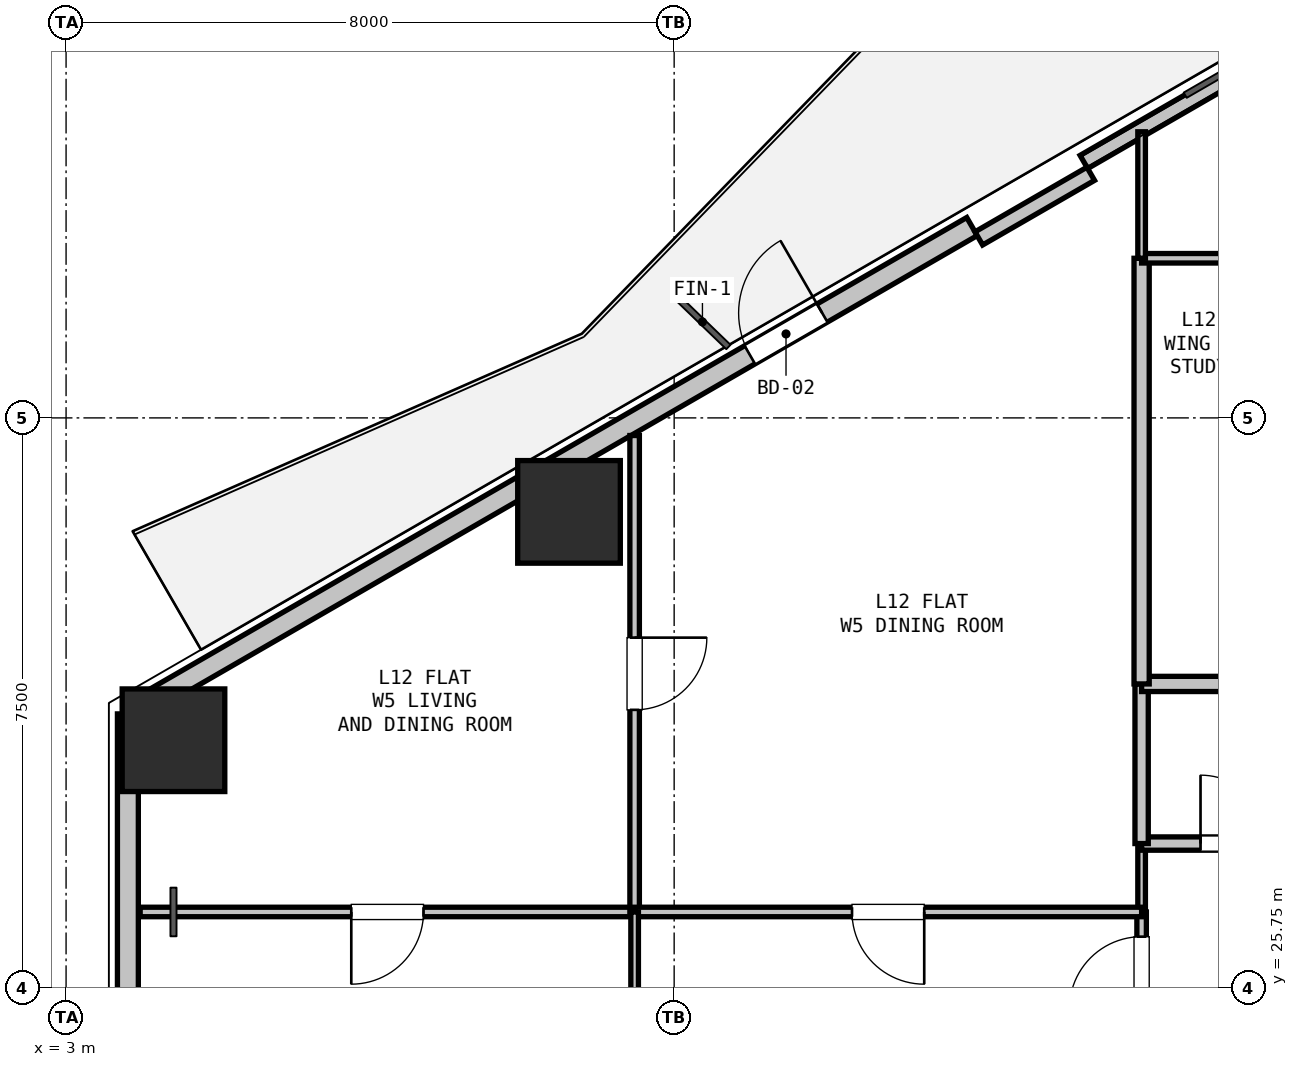
"""IFC4 building model, lengths in metres.
Left out: names, types, materials, properties, quantities, classifications, styles, units other than length and angle.
Written with IfcOpenShell. Run it as: python <this file> out.ifc"""

import sys

from ifc_helpers import new_model, si_unit, direction, frame, frame_2d, origin, origin_2d, place, context, subcontext, project, spatial, rectangle, hollow_rectangle, extrude, element, fill, save


model = new_model("IFC4")
c1 = context("Model", 3, precision=1e-05, world=origin(), true_north=direction((0.0, 1.0)))
c2 = subcontext(c1, "Body", "Model", "MODEL_VIEW")
j1 = project(units=[si_unit("LENGTHUNIT", "METRE"), si_unit("PLANEANGLEUNIT", "RADIAN")], contexts=[c1])
p1 = place(None, origin())
s1 = spatial("IfcSite", under=j1, at=p1, CompositionType="ELEMENT")
p2 = place(p1, origin())
s2 = spatial("IfcBuilding", under=s1, at=p2, CompositionType="ELEMENT")
p3 = place(p2, frame((0.0, 0.0, 45.6)))
s3 = spatial("IfcBuildingStorey", under=s2, at=p3, CompositionType="ELEMENT", Elevation=45.6)
for number, where, z_axis, x_axis in (
    (1, (4.413, 29.009, 0.0), (0.0, 0.0, 1.0), (1.0, 0.0, 0.0)),
    (2, (9.617, 32.014, 0.0), (0.0, 0.0, 1.0), (1.0, 0.0, 0.0)),
):
    element("IfcColumn", number, at=place(p3, frame(where, z_axis=z_axis, x_axis=x_axis)), inside=s3, PredefinedType="COLUMN", context=c2, shape_type="SweptSolid", body=[
        extrude(hollow_rectangle(XDim=1.35, YDim=1.35, WallThickness=0.036, at=origin_2d()), origin(), (0.0, 0.0, 1.0), 3.3),
    ])
p4 = place(p3, frame((3.813, 24.144, 0.0), z_axis=(0.0, 0.0, 1.0), x_axis=(0.0, 1.0, 0.0)))
e3 = element("IfcWall", 3, at=p4, inside=s3, PredefinedType="SOLIDWALL", context=c2, shape_type="SweptSolid", body=[
    extrude(rectangle(XDim=5.211, YDim=0.275, at=frame_2d((2.606, 0.0))), origin(), (0.0, 0.0, 1.0), 2.66),
])
p5 = place(p3, frame((3.943, 29.431, 0.0), z_axis=(0.0, 0.0, 1.0), x_axis=(0.866027105532, 0.499997052475, 0.0)))
e4 = element("IfcWall", 4, at=p5, inside=s3, PredefinedType="SOLIDWALL", context=c2, shape_type="SweptSolid", body=[
    extrude(rectangle(XDim=12.673, YDim=0.275, at=frame_2d((6.336, 0.0))), origin(), (0.0, 0.0, 1.0), 2.66),
])
p6 = place(p5, frame((9.298, 0.0, 0.0)))
e5 = element("IfcOpeningElement", 5, at=p6, cuts=e4, PredefinedType="OPENING", context=c2, shape_type="SweptSolid", body=[
    extrude(rectangle(XDim=1.1, YDim=2.1, at=frame_2d((0.55, 1.05))), frame((0.0, 0.147, 0.0), z_axis=(0.0, -1.0, 0.0), x_axis=(1.0, 0.0, 0.0)), (0.0, 0.0, 1.0), 0.295),
])
p7 = place(p3, frame((16.39, 36.617, 0.0), z_axis=(0.0, 0.0, 1.0), x_axis=(0.866027351828, 0.499996625875, 0.0)))
e6 = element("IfcWall", 6, at=p7, inside=s3, PredefinedType="PARAPET", context=c2, shape_type="SweptSolid", body=[
    extrude(rectangle(XDim=11.973, YDim=0.2, at=frame_2d((5.987, 0.0))), origin(), (0.0, 0.0, 1.0), 0.2),
])
p8 = place(p3, frame((15.008, 35.611, 0.0), z_axis=(0.0, 0.0, 1.0), x_axis=(0.86605165483, 0.499954529098, 0.0)))
e7 = element("IfcWall", 7, at=p8, inside=s3, PredefinedType="PARAPET", context=c2, shape_type="SweptSolid", body=[
    extrude(rectangle(XDim=1.7, YDim=0.2, at=frame_2d((0.85, 0.0))), origin(), (0.0, 0.0, 1.0), 2.66),
])
p9 = place(p3, frame((17.15, 25.15, 0.0), z_axis=(0.0, 0.0, 1.0), x_axis=(0.0, 1.0, 0.0)))
e8 = element("IfcWall", 8, at=p9, inside=s3, PredefinedType="PARTITIONING", context=c2, shape_type="SweptSolid", body=[
    extrude(rectangle(XDim=1.6, YDim=0.125, at=frame_2d((0.8, 0.0))), origin(), (0.0, 0.0, 1.0), 3.04),
])
p10 = place(p9, frame((0.325, 0.0, 0.0)))
e9 = element("IfcOpeningElement", 9, at=p10, cuts=e8, PredefinedType="OPENING", context=c2, shape_type="SweptSolid", body=[
    extrude(rectangle(XDim=0.95, YDim=2.1, at=frame_2d((0.475, 1.05))), frame((0.0, 0.073, 0.0), z_axis=(0.0, -1.0, 0.0), x_axis=(1.0, 0.0, 0.0)), (0.0, 0.0, 1.0), 0.145),
])
p11 = place(p3, frame((17.15, 26.75, 0.0), z_axis=(0.0, 0.0, 1.0), x_axis=(0.0, 1.0, 0.0)))
e10 = element("IfcWall", 10, at=p11, inside=s3, PredefinedType="PARTITIONING", context=c2, shape_type="SweptSolid", body=[
    extrude(rectangle(XDim=0.9, YDim=0.1, at=frame_2d((0.45, 0.0))), origin(), (0.0, 0.0, 1.0), 3.04),
])
p12 = place(p3, frame((17.15, 27.65, 0.0), z_axis=(0.0, 0.0, 1.0), x_axis=(1.0, 0.0, 0.0)))
e11 = element("IfcWall", 11, at=p12, inside=s3, PredefinedType="PLUMBINGWALL", context=c2, shape_type="SweptSolid", body=[
    extrude(rectangle(XDim=2.45, YDim=0.175, at=frame_2d((1.225, 0.0))), origin(), (0.0, 0.0, 1.0), 3.04),
])
p13 = place(p12, frame((0.775, 0.0, 0.0)))
e12 = element("IfcOpeningElement", 12, at=p13, cuts=e11, PredefinedType="OPENING", context=c2, shape_type="SweptSolid", body=[
    extrude(rectangle(XDim=0.9, YDim=2.1, at=frame_2d((0.45, 1.05))), frame((0.0, 0.097, 0.0), z_axis=(0.0, -1.0, 0.0), x_axis=(1.0, 0.0, 0.0)), (0.0, 0.0, 1.0), 0.195),
])
p14 = place(p3, frame((17.15, 27.65, 0.0), z_axis=(0.0, 0.0, 1.0), x_axis=(0.0, 1.0, 0.0)))
e13 = element("IfcWall", 13, at=p14, inside=s3, PredefinedType="PLUMBINGWALL", context=c2, shape_type="SweptSolid", body=[
    extrude(rectangle(XDim=2.1, YDim=0.175, at=frame_2d((1.05, 0.0))), origin(), (0.0, 0.0, 1.0), 3.04),
])
p15 = place(p3, frame((17.15, 29.75, 0.0), z_axis=(0.0, 0.0, 1.0), x_axis=(1.0, 0.0, 0.0)))
e14 = element("IfcWall", 14, at=p15, inside=s3, PredefinedType="PARTITIONING", context=c2, shape_type="SweptSolid", body=[
    extrude(rectangle(XDim=2.45, YDim=0.2, at=frame_2d((1.225, 0.0))), origin(), (0.0, 0.0, 1.0), 3.04),
])
p16 = place(p3, frame((17.15, 29.75, 0.0), z_axis=(0.0, 0.0, 1.0), x_axis=(0.0, 1.0, 0.0)))
e15 = element("IfcWall", 15, at=p16, inside=s3, PredefinedType="PARTITIONING", context=c2, shape_type="SweptSolid", body=[
    extrude(rectangle(XDim=5.6, YDim=0.2, at=frame_2d((2.8, 0.0))), origin(), (0.0, 0.0, 1.0), 2.337),
])
p17 = place(p3, frame((17.15, 35.35, 0.0), z_axis=(0.0, 0.0, 1.0), x_axis=(1.0, 0.0, 0.0)))
e16 = element("IfcWall", 16, at=p17, inside=s3, PredefinedType="PARTITIONING", context=c2, shape_type="SweptSolid", body=[
    extrude(rectangle(XDim=2.45, YDim=0.125, at=frame_2d((1.225, 0.0))), origin(), (0.0, 0.0, 1.0), 3.04),
])
p18 = place(p3, frame((10.48, 26.75, 0.0), z_axis=(0.0, 0.0, 1.0), x_axis=(-1.0, 0.0, 0.0)))
e17 = element("IfcWall", 17, at=p18, inside=s3, PredefinedType="PARTITIONING", context=c2, shape_type="SweptSolid", body=[
    extrude(rectangle(XDim=6.505, YDim=0.125, at=frame_2d((3.253, 0.0))), origin(), (0.0, 0.0, 1.0), 2.65),
])
p19 = place(p18, frame((2.778, 0.0, 0.0)))
e18 = element("IfcOpeningElement", 18, at=p19, cuts=e17, PredefinedType="OPENING", context=c2, shape_type="SweptSolid", body=[
    extrude(rectangle(XDim=0.95, YDim=2.1, at=frame_2d((0.475, 1.05))), frame((0.0, 0.073, 0.0), z_axis=(0.0, -1.0, 0.0), x_axis=(1.0, 0.0, 0.0)), (0.0, 0.0, 1.0), 0.145),
])
p20 = place(p3, frame((3.813, 29.356, 0.0), z_axis=(0.0, 0.0, 1.0), x_axis=(0.866131372301, 0.499816412211, 0.0)))
e19 = element("IfcWall", 19, at=p20, inside=s3, PredefinedType="PARTITIONING", context=c2, shape_type="SweptSolid", body=[
    extrude(rectangle(XDim=0.15, YDim=0.1, at=frame_2d((0.075, 0.0))), origin(), (0.0, 0.0, 1.0), 3.04),
])
p21 = place(p3, frame((10.48, 33.018, 0.0), z_axis=(0.0, 0.0, 1.0), x_axis=(0.0, -1.0, 0.0)))
e20 = element("IfcWall", 20, at=p21, inside=s3, PredefinedType="PARTITIONING", context=c2, shape_type="SweptSolid", body=[
    extrude(rectangle(XDim=6.268, YDim=0.125, at=frame_2d((3.134, 0.0))), origin(), (0.0, 0.0, 1.0), 2.337),
])
p22 = place(p21, frame((2.659, 0.0, 0.0)))
e21 = element("IfcOpeningElement", 21, at=p22, cuts=e20, PredefinedType="OPENING", context=c2, shape_type="SweptSolid", body=[
    extrude(rectangle(XDim=0.95, YDim=2.1, at=frame_2d((0.475, 1.05))), frame((0.0, 0.073, 0.0), z_axis=(0.0, -1.0, 0.0), x_axis=(1.0, 0.0, 0.0)), (0.0, 0.0, 1.0), 0.145),
])
p23 = place(p3, frame((17.15, 37.014, 0.0), z_axis=(0.0, 0.0, 1.0), x_axis=(0.0, -1.0, 0.0)))
e22 = element("IfcWall", 22, at=p23, inside=s3, PredefinedType="PARTITIONING", context=c2, shape_type="SweptSolid", body=[
    extrude(rectangle(XDim=1.664, YDim=0.1, at=frame_2d((0.832, 0.0))), origin(), (0.0, 0.0, 1.0), 2.365),
])
p24 = place(p3, frame((17.15, 26.75, 0.0), z_axis=(0.0, 0.0, 1.0), x_axis=(-1.0, 0.0, 0.0)))
e23 = element("IfcWall", 23, at=p24, inside=s3, PredefinedType="PARTITIONING", context=c2, shape_type="SweptSolid", body=[
    extrude(rectangle(XDim=6.67, YDim=0.125, at=frame_2d((3.335, 0.0))), origin(), (0.0, 0.0, 1.0), 3.04),
])
p25 = place(p24, frame((2.86, 0.0, 0.0)))
e24 = element("IfcOpeningElement", 24, at=p25, cuts=e23, PredefinedType="OPENING", context=c2, shape_type="SweptSolid", body=[
    extrude(rectangle(XDim=0.95, YDim=2.1, at=frame_2d((0.475, 1.05))), frame((0.0, 0.073, 0.0), z_axis=(0.0, -1.0, 0.0), x_axis=(1.0, 0.0, 0.0)), (0.0, 0.0, 1.0), 0.145),
])
p26 = place(p3, frame((10.48, 26.75, 0.0), z_axis=(0.0, 0.0, 1.0), x_axis=(0.0, -1.0, 0.0)))
e25 = element("IfcWall", 25, at=p26, inside=s3, PredefinedType="PARTITIONING", context=c2, shape_type="SweptSolid", body=[
    extrude(rectangle(XDim=6.268, YDim=0.1, at=frame_2d((3.134, 0.0))), origin(), (0.0, 0.0, 1.0), 2.337),
])
p27 = place(p26, frame((2.659, 0.0, 0.0)))
e26 = element("IfcOpeningElement", 26, at=p27, cuts=e25, PredefinedType="OPENING", context=c2, shape_type="SweptSolid", body=[
    extrude(rectangle(XDim=0.95, YDim=2.1, at=frame_2d((0.475, 1.05))), frame((0.0, 0.06, 0.0), z_axis=(0.0, -1.0, 0.0), x_axis=(1.0, 0.0, 0.0)), (0.0, 0.0, 1.0), 0.12),
])
p28 = place(p6, origin())
e27 = element("IfcDoor", 27, at=p28, inside=s3, OperationType="SINGLE_SWING_RIGHT", PredefinedType="DOOR", context=c2, shape_type="SweptSolid", body=[
    extrude(rectangle(XDim=1.1, YDim=2.1, at=frame_2d((0.55, 1.05))), frame((0.0, 0.025, 0.0), z_axis=(0.0, -1.0, 0.0), x_axis=(1.0, 0.0, 0.0)), (0.0, 0.0, 1.0), 0.05),
])
fill(e5, e27)
p29 = place(p13, origin())
e28 = element("IfcDoor", 28, at=p29, inside=s3, OperationType="SINGLE_SWING_LEFT", PredefinedType="DOOR", context=c2, shape_type="SweptSolid", body=[
    extrude(rectangle(XDim=0.9, YDim=2.1, at=frame_2d((0.45, 1.05))), frame((0.0, 0.025, 0.0), z_axis=(0.0, -1.0, 0.0), x_axis=(1.0, 0.0, 0.0)), (0.0, 0.0, 1.0), 0.05),
])
fill(e12, e28)
p30 = place(p10, origin())
e29 = element("IfcDoor", 29, at=p30, inside=s3, OperationType="SINGLE_SWING_LEFT", PredefinedType="DOOR", context=c2, shape_type="SweptSolid", body=[
    extrude(rectangle(XDim=0.95, YDim=2.1, at=frame_2d((0.475, 1.05))), frame((0.0, 0.025, 0.0), z_axis=(0.0, -1.0, 0.0), x_axis=(1.0, 0.0, 0.0)), (0.0, 0.0, 1.0), 0.05),
])
fill(e9, e29)
p31 = place(p22, origin())
e30 = element("IfcDoor", 30, at=p31, inside=s3, OperationType="SINGLE_SWING_LEFT", PredefinedType="DOOR", context=c2, shape_type="SweptSolid", body=[
    extrude(rectangle(XDim=0.95, YDim=2.1, at=frame_2d((0.475, 1.05))), frame((0.0, 0.025, 0.0), z_axis=(0.0, -1.0, 0.0), x_axis=(1.0, 0.0, 0.0)), (0.0, 0.0, 1.0), 0.05),
])
fill(e21, e30)
p32 = place(p19, origin())
e31 = element("IfcDoor", 31, at=p32, inside=s3, OperationType="SINGLE_SWING_RIGHT", PredefinedType="DOOR", context=c2, shape_type="SweptSolid", body=[
    extrude(rectangle(XDim=0.95, YDim=2.1, at=frame_2d((0.475, 1.05))), frame((0.0, 0.025, 0.0), z_axis=(0.0, -1.0, 0.0), x_axis=(1.0, 0.0, 0.0)), (0.0, 0.0, 1.0), 0.05),
])
fill(e18, e31)
p33 = place(p25, origin())
e32 = element("IfcDoor", 32, at=p33, inside=s3, OperationType="SINGLE_SWING_LEFT", PredefinedType="DOOR", context=c2, shape_type="SweptSolid", body=[
    extrude(rectangle(XDim=0.95, YDim=2.1, at=frame_2d((0.475, 1.05))), frame((0.0, 0.025, 0.0), z_axis=(0.0, -1.0, 0.0), x_axis=(1.0, 0.0, 0.0)), (0.0, 0.0, 1.0), 0.05),
])
fill(e24, e32)
save(model, sys.argv[1])
